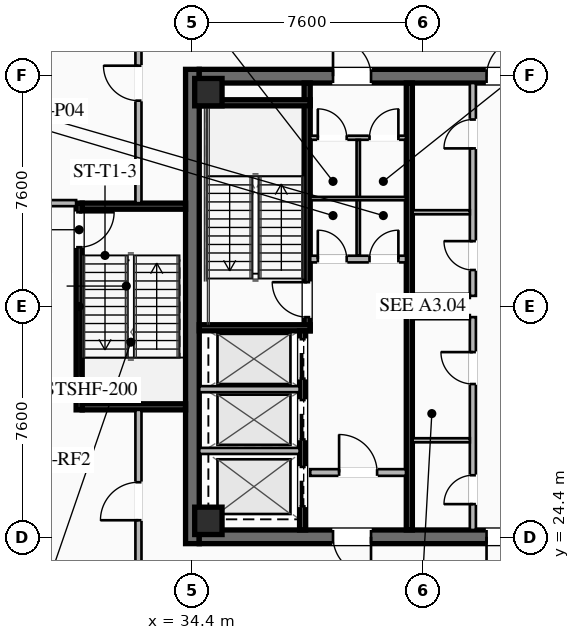
"""IFC4 building model, lengths in metres.
Left out: names, types, materials, properties, quantities, classifications, styles, units other than length and angle.
Written with IfcOpenShell. Run it as: python <this file> out.ifc"""

import sys

from ifc_helpers import new_model, si_unit, direction, frame, frame_2d, origin, origin_2d, place, context, subcontext, project, spatial, rectangle, hollow_rectangle, extrude, element, fill, save


model = new_model("IFC4")
c1 = context("Model", 3, precision=1e-05, world=origin(), true_north=direction((0.0, 1.0)))
c2 = subcontext(c1, "Body", "Model", "MODEL_VIEW")
j1 = project(units=[si_unit("LENGTHUNIT", "METRE"), si_unit("PLANEANGLEUNIT", "RADIAN")], contexts=[c1])
p1 = place(None, origin())
s1 = spatial("IfcSite", under=j1, at=p1, CompositionType="ELEMENT")
p2 = place(p1, origin())
s2 = spatial("IfcBuilding", under=s1, at=p2, CompositionType="ELEMENT")
p3 = place(p2, frame((0.0, 0.0, 246.8)))
s3 = spatial("IfcBuildingStorey", under=s2, at=p3, CompositionType="ELEMENT", Elevation=246.8)
p4 = place(p3, frame((34.425, 24.2, 0.0), z_axis=(0.0, 0.0, 1.0), x_axis=(0.0, 1.0, 0.0)))
e1 = element("IfcWall", 1, at=p4, inside=s3, PredefinedType="SHEAR", context=c2, shape_type="SweptSolid", body=[
    extrude(rectangle(XDim=15.6, YDim=0.45, at=frame_2d((7.8, 0.0))), origin(), (0.0, 0.0, 1.0), 4.6),
])
p5 = place(p3, frame((49.35, 24.425, 0.0), z_axis=(0.0, 0.0, 1.0), x_axis=(-1.0, 0.0, 0.0)))
e2 = element("IfcWall", 2, at=p5, inside=s3, PredefinedType="SHEAR", context=c2, shape_type="SweptSolid", body=[
    extrude(rectangle(XDim=14.7, YDim=0.45, at=frame_2d((7.35, 0.0))), origin(), (0.0, 0.0, 1.0), 4.6),
])
p6 = place(p5, frame((9.05, 0.0, 0.0)))
e3 = element("IfcOpeningElement", 3, at=p6, cuts=e2, PredefinedType="OPENING", context=c2, shape_type="SweptSolid", body=[
    extrude(rectangle(XDim=1.25, YDim=2.25, at=frame_2d((0.625, 1.125))), frame((0.0, 0.235, 0.0), z_axis=(0.0, -1.0, 0.0), x_axis=(1.0, 0.0, 0.0)), (0.0, 0.0, 1.0), 0.47),
])
p7 = place(p5, frame((4.0, 0.0, 0.0)))
e4 = element("IfcOpeningElement", 4, at=p7, cuts=e2, PredefinedType="OPENING", context=c2, shape_type="SweptSolid", body=[
    extrude(rectangle(XDim=1.25, YDim=2.25, at=frame_2d((0.625, 1.125))), frame((0.0, 0.235, 0.0), z_axis=(0.0, -1.0, 0.0), x_axis=(1.0, 0.0, 0.0)), (0.0, 0.0, 1.0), 0.47),
])
p8 = place(p3, frame((34.65, 39.575, 0.0), z_axis=(0.0, 0.0, 1.0), x_axis=(1.0, 0.0, 0.0)))
e5 = element("IfcWall", 5, at=p8, inside=s3, PredefinedType="SHEAR", context=c2, shape_type="SweptSolid", body=[
    extrude(rectangle(XDim=14.7, YDim=0.45, at=frame_2d((7.35, 0.0))), origin(), (0.0, 0.0, 1.0), 4.6),
])
p9 = place(p8, frame((4.4, 0.0, 0.0)))
e6 = element("IfcOpeningElement", 6, at=p9, cuts=e5, PredefinedType="OPENING", context=c2, shape_type="SweptSolid", body=[
    extrude(rectangle(XDim=1.25, YDim=2.25, at=frame_2d((0.625, 1.125))), frame((0.0, 0.235, 0.0), z_axis=(0.0, -1.0, 0.0), x_axis=(1.0, 0.0, 0.0)), (0.0, 0.0, 1.0), 0.47),
])
p10 = place(p8, frame((9.45, 0.0, 0.0)))
e7 = element("IfcOpeningElement", 7, at=p10, cuts=e5, PredefinedType="OPENING", context=c2, shape_type="SweptSolid", body=[
    extrude(rectangle(XDim=1.25, YDim=2.25, at=frame_2d((0.625, 1.125))), frame((0.0, 0.235, 0.0), z_axis=(0.0, -1.0, 0.0), x_axis=(1.0, 0.0, 0.0)), (0.0, 0.0, 1.0), 0.47),
])
for number, where, z_axis, x_axis in (
    (8, (34.95, 24.95, 0.0), (0.0, 0.0, 1.0), (1.0, 0.0, 0.0)),
    (9, (34.95, 39.05, 0.0), (0.0, 0.0, 1.0), (1.0, 0.0, 0.0)),
):
    element("IfcColumn", number, at=place(p3, frame(where, z_axis=z_axis, x_axis=x_axis)), inside=s3, PredefinedType="COLUMN", context=c2, shape_type="SweptSolid", body=[
        extrude(hollow_rectangle(XDim=0.9, YDim=0.9, WallThickness=0.04, at=origin_2d()), origin(), (0.0, 0.0, 1.0), 4.38),
    ])
p11 = place(p3, frame((38.2, 31.2, 0.0), z_axis=(0.0, 0.0, 1.0), x_axis=(0.0, 1.0, 0.0)))
e10 = element("IfcWall", 10, at=p11, inside=s3, PredefinedType="SHEAR", context=c2, shape_type="SweptSolid", body=[
    extrude(rectangle(XDim=8.15, YDim=0.2, at=frame_2d((4.075, 0.0))), origin(), (0.0, 0.0, 1.0), 4.38),
])
p12 = place(p11, frame((0.45, 0.0, 0.0)))
e11 = element("IfcOpeningElement", 11, at=p12, cuts=e10, PredefinedType="OPENING", context=c2, shape_type="SweptSolid", body=[
    extrude(rectangle(XDim=1.15, YDim=2.2, at=frame_2d((0.575, 1.1))), frame((0.0, 0.11, 0.0), z_axis=(0.0, -1.0, 0.0), x_axis=(1.0, 0.0, 0.0)), (0.0, 0.0, 1.0), 0.22),
])
for number, where, z_axis, x_axis in (
    (12, (34.65, 31.3, 0.0), (0.0, 0.0, 1.0), (1.0, 0.0, 0.0)),
    (13, (34.65, 38.7, 0.0), (0.0, 0.0, 1.0), (1.0, 0.0, 0.0)),
):
    element("IfcWall", number, at=place(p3, frame(where, z_axis=z_axis, x_axis=x_axis)), inside=s3, PredefinedType="SHEAR", context=c2, shape_type="SweptSolid", body=[
        extrude(rectangle(XDim=3.65, YDim=0.2, at=frame_2d((1.825, 0.0))), origin(), (0.0, 0.0, 1.0), 4.38),
    ])
p13 = place(p3, frame((41.56, 24.65, 0.0), z_axis=(0.0, 0.0, 1.0), x_axis=(0.0, 1.0, 0.0)))
e14 = element("IfcWall", 14, at=p13, inside=s3, PredefinedType="SHEAR", context=c2, shape_type="SweptSolid", body=[
    extrude(rectangle(XDim=14.7, YDim=0.2, at=frame_2d((7.35, 0.0))), origin(), (0.0, 0.0, 1.0), 4.38),
])
p14 = place(p3, frame((38.3, 33.56, 0.0), z_axis=(0.0, 0.0, 1.0), x_axis=(1.0, 0.0, 0.0)))
e15 = element("IfcWall", 15, at=p14, inside=s3, PredefinedType="SOLIDWALL", context=c2, shape_type="SweptSolid", body=[
    extrude(rectangle(XDim=3.15, YDim=0.22, at=frame_2d((1.575, 0.0))), origin(), (0.0, 0.0, 1.0), 3.491),
])
p15 = place(p14, frame((0.25, 0.0, 0.0)))
e16 = element("IfcOpeningElement", 16, at=p15, cuts=e15, PredefinedType="OPENING", context=c2, shape_type="SweptSolid", body=[
    extrude(rectangle(XDim=0.95, YDim=2.05, at=frame_2d((0.475, 1.025))), frame((0.0, 0.12, 0.0), z_axis=(0.0, -1.0, 0.0), x_axis=(1.0, 0.0, 0.0)), (0.0, 0.0, 1.0), 0.24),
])
p16 = place(p14, frame((1.95, 0.0, 0.0)))
e17 = element("IfcOpeningElement", 17, at=p16, cuts=e15, PredefinedType="OPENING", context=c2, shape_type="SweptSolid", body=[
    extrude(rectangle(XDim=0.95, YDim=2.05, at=frame_2d((0.475, 1.025))), frame((0.0, 0.12, 0.0), z_axis=(0.0, -1.0, 0.0), x_axis=(1.0, 0.0, 0.0)), (0.0, 0.0, 1.0), 0.24),
])
p17 = place(p3, frame((38.3, 26.54, 0.0), z_axis=(0.0, 0.0, 1.0), x_axis=(1.0, 0.0, 0.0)))
e18 = element("IfcWall", 18, at=p17, inside=s3, PredefinedType="SOLIDWALL", context=c2, shape_type="SweptSolid", body=[
    extrude(rectangle(XDim=3.15, YDim=0.22, at=frame_2d((1.575, 0.0))), origin(), (0.0, 0.0, 1.0), 3.491),
])
p18 = place(p17, frame((0.95, 0.0, 0.0)))
e19 = element("IfcOpeningElement", 19, at=p18, cuts=e18, PredefinedType="OPENING", context=c2, shape_type="SweptSolid", body=[
    extrude(rectangle(XDim=1.25, YDim=2.25, at=frame_2d((0.625, 1.125))), frame((0.0, 0.12, 0.0), z_axis=(0.0, -1.0, 0.0), x_axis=(1.0, 0.0, 0.0)), (0.0, 0.0, 1.0), 0.24),
])
p19 = place(p3, frame((38.05, 24.65, 0.0), z_axis=(0.0, 0.0, 1.0), x_axis=(0.0, 1.0, 0.0)))
e20 = element("IfcWall", 20, at=p19, inside=s3, PredefinedType="SHEAR", context=c2, shape_type="SweptSolid", body=[
    extrude(rectangle(XDim=6.55, YDim=0.2, at=frame_2d((3.275, 0.0))), origin(), (0.0, 0.0, 1.0), 4.38),
])
p20 = place(p19, frame((4.975, 0.0, 0.0)))
e21 = element("IfcOpeningElement", 21, at=p20, cuts=e20, PredefinedType="OPENING", context=c2, shape_type="SweptSolid", body=[
    extrude(rectangle(XDim=1.3, YDim=2.25, at=frame_2d((0.65, 1.125))), frame((0.0, 0.11, 0.0), z_axis=(0.0, -1.0, 0.0), x_axis=(1.0, 0.0, 0.0)), (0.0, 0.0, 1.0), 0.22),
])
p21 = place(p19, frame((2.975, 0.0, 0.0)))
e22 = element("IfcOpeningElement", 22, at=p21, cuts=e20, PredefinedType="OPENING", context=c2, shape_type="SweptSolid", body=[
    extrude(rectangle(XDim=1.3, YDim=2.25, at=frame_2d((0.65, 1.125))), frame((0.0, 0.11, 0.0), z_axis=(0.0, -1.0, 0.0), x_axis=(1.0, 0.0, 0.0)), (0.0, 0.0, 1.0), 0.22),
])
p22 = place(p19, frame((0.775, 0.0, 0.0)))
e23 = element("IfcOpeningElement", 23, at=p22, cuts=e20, PredefinedType="OPENING", context=c2, shape_type="SweptSolid", body=[
    extrude(rectangle(XDim=1.3, YDim=2.25, at=frame_2d((0.65, 1.125))), frame((0.0, 0.11, 0.0), z_axis=(0.0, -1.0, 0.0), x_axis=(1.0, 0.0, 0.0)), (0.0, 0.0, 1.0), 0.22),
])
for number, where, z_axis, x_axis in (
    (24, (34.65, 27.25, 0.0), (0.0, 0.0, 1.0), (1.0, 0.0, 0.0)),
    (25, (34.65, 29.28, 0.0), (0.0, 0.0, 1.0), (1.0, 0.0, 0.0)),
):
    element("IfcWall", number, at=place(p3, frame(where, z_axis=z_axis, x_axis=x_axis)), inside=s3, PredefinedType="SOLIDWALL", context=c2, shape_type="SweptSolid", body=[
        extrude(rectangle(XDim=3.3, YDim=0.2, at=frame_2d((1.65, 0.0))), origin(), (0.0, 0.0, 1.0), 4.38),
    ])
p23 = place(p3, frame((38.3, 37.55, 0.0), z_axis=(0.0, 0.0, 1.0), x_axis=(1.0, 0.0, 0.0)))
e26 = element("IfcWall", 26, at=p23, inside=s3, PredefinedType="PARTITIONING", context=c2, shape_type="SweptSolid", body=[
    extrude(rectangle(XDim=3.15, YDim=0.135, at=frame_2d((1.575, 0.0))), origin(), (0.0, 0.0, 1.0), 3.491),
])
p24 = place(p23, frame((0.25, 0.0, 0.0)))
e27 = element("IfcOpeningElement", 27, at=p24, cuts=e26, PredefinedType="OPENING", context=c2, shape_type="SweptSolid", body=[
    extrude(rectangle(XDim=0.95, YDim=2.05, at=frame_2d((0.475, 1.025))), frame((0.0, 0.077, 0.0), z_axis=(0.0, -1.0, 0.0), x_axis=(1.0, 0.0, 0.0)), (0.0, 0.0, 1.0), 0.155),
])
p25 = place(p23, frame((1.95, 0.0, 0.0)))
e28 = element("IfcOpeningElement", 28, at=p25, cuts=e26, PredefinedType="OPENING", context=c2, shape_type="SweptSolid", body=[
    extrude(rectangle(XDim=0.95, YDim=2.05, at=frame_2d((0.475, 1.025))), frame((0.0, 0.077, 0.0), z_axis=(0.0, -1.0, 0.0), x_axis=(1.0, 0.0, 0.0)), (0.0, 0.0, 1.0), 0.155),
])
p26 = place(p3, frame((39.88, 33.68, 0.0), z_axis=(0.0, 0.0, 1.0), x_axis=(0.0, 1.0, 0.0)))
e29 = element("IfcWall", 29, at=p26, inside=s3, PredefinedType="PARTITIONING", context=c2, shape_type="SweptSolid", body=[
    extrude(rectangle(XDim=3.8, YDim=0.11, at=frame_2d((1.9, 0.0))), origin(), (0.0, 0.0, 1.0), 3.491),
])
p27 = place(p3, frame((38.3, 35.55, 0.0), z_axis=(0.0, 0.0, 1.0), x_axis=(1.0, 0.0, 0.0)))
e30 = element("IfcWall", 30, at=p27, inside=s3, PredefinedType="PARTITIONING", context=c2, shape_type="SweptSolid", body=[
    extrude(rectangle(XDim=3.15, YDim=0.11, at=frame_2d((1.575, 0.0))), origin(), (0.0, 0.0, 1.0), 3.491),
])
p28 = place(p3, frame((43.65, 24.65, 0.0), z_axis=(0.0, 0.0, 1.0), x_axis=(0.0, 1.0, 0.0)))
e31 = element("IfcWall", 31, at=p28, inside=s3, PredefinedType="SOLIDWALL", context=c2, shape_type="SweptSolid", body=[
    extrude(rectangle(XDim=7.0, YDim=0.2, at=frame_2d((3.5, 0.0))), origin(), (0.0, 0.0, 1.0), 3.491),
])
p29 = place(p28, frame((0.85, 0.0, 0.0)))
e32 = element("IfcOpeningElement", 32, at=p29, cuts=e31, PredefinedType="OPENING", context=c2, shape_type="SweptSolid", body=[
    extrude(rectangle(XDim=0.95, YDim=2.05, at=frame_2d((0.475, 1.025))), frame((0.0, 0.11, 0.0), z_axis=(0.0, -1.0, 0.0), x_axis=(1.0, 0.0, 0.0)), (0.0, 0.0, 1.0), 0.22),
])
p30 = place(p28, frame((4.8, 0.0, 0.0)))
e33 = element("IfcOpeningElement", 33, at=p30, cuts=e31, PredefinedType="OPENING", context=c2, shape_type="SweptSolid", body=[
    extrude(rectangle(XDim=1.05, YDim=2.2, at=frame_2d((0.525, 1.1))), frame((0.0, 0.11, 0.0), z_axis=(0.0, -1.0, 0.0), x_axis=(1.0, 0.0, 0.0)), (0.0, 0.0, 1.0), 0.22),
])
for number, where, z_axis, x_axis in (
    (34, (41.67, 31.65, 0.0), (0.0, 0.0, 1.0), (1.0, 0.0, 0.0)),
    (35, (41.67, 27.6, 0.0), (0.0, 0.0, 1.0), (1.0, 0.0, 0.0)),
):
    element("IfcWall", number, at=place(p3, frame(where, z_axis=z_axis, x_axis=x_axis)), inside=s3, PredefinedType="PARTITIONING", context=c2, shape_type="SweptSolid", body=[
        extrude(rectangle(XDim=1.88, YDim=0.135, at=frame_2d((0.94, 0.0))), origin(), (0.0, 0.0, 1.0), 3.491),
    ])
p31 = place(p3, frame((43.65, 32.35, 0.0), z_axis=(0.0, 0.0, 1.0), x_axis=(0.0, 1.0, 0.0)))
e36 = element("IfcWall", 36, at=p31, inside=s3, PredefinedType="SOLIDWALL", context=c2, shape_type="SweptSolid", body=[
    extrude(rectangle(XDim=7.0, YDim=0.2, at=frame_2d((3.5, 0.0))), origin(), (0.0, 0.0, 1.0), 3.491),
])
p32 = place(p31, frame((0.85, 0.0, 0.0)))
e37 = element("IfcOpeningElement", 37, at=p32, cuts=e36, PredefinedType="OPENING", context=c2, shape_type="SweptSolid", body=[
    extrude(rectangle(XDim=0.95, YDim=2.05, at=frame_2d((0.475, 1.025))), frame((0.0, 0.11, 0.0), z_axis=(0.0, -1.0, 0.0), x_axis=(1.0, 0.0, 0.0)), (0.0, 0.0, 1.0), 0.22),
])
p33 = place(p31, frame((4.85, 0.0, 0.0)))
e38 = element("IfcOpeningElement", 38, at=p33, cuts=e36, PredefinedType="OPENING", context=c2, shape_type="SweptSolid", body=[
    extrude(rectangle(XDim=0.95, YDim=2.05, at=frame_2d((0.475, 1.025))), frame((0.0, 0.11, 0.0), z_axis=(0.0, -1.0, 0.0), x_axis=(1.0, 0.0, 0.0)), (0.0, 0.0, 1.0), 0.22),
])
for number, where, z_axis, x_axis in (
    (39, (41.67, 32.35, 0.0), (0.0, 0.0, 1.0), (1.0, 0.0, 0.0)),
    (40, (41.67, 35.1, 0.0), (0.0, 0.0, 1.0), (1.0, 0.0, 0.0)),
):
    element("IfcWall", number, at=place(p3, frame(where, z_axis=z_axis, x_axis=x_axis)), inside=s3, PredefinedType="PARTITIONING", context=c2, shape_type="SweptSolid", body=[
        extrude(rectangle(XDim=1.88, YDim=0.135, at=frame_2d((0.94, 0.0))), origin(), (0.0, 0.0, 1.0), 3.491),
    ])
p34 = place(p3, frame((30.7, 35.4, 0.0), z_axis=(0.0, 0.0, 1.0), x_axis=(0.0, -1.0, 0.0)))
e41 = element("IfcWall", 41, at=p34, inside=s3, PredefinedType="SHEAR", context=c2, shape_type="SweptSolid", body=[
    extrude(rectangle(XDim=6.8, YDim=0.2, at=frame_2d((3.4, 0.0))), origin(), (0.0, 0.0, 1.0), 4.38),
])
p35 = place(p34, frame((0.3, 0.0, 0.0)))
e42 = element("IfcOpeningElement", 42, at=p35, cuts=e41, PredefinedType="OPENING", context=c2, shape_type="SweptSolid", body=[
    extrude(rectangle(XDim=1.15, YDim=2.2, at=frame_2d((0.575, 1.1))), frame((0.0, 0.11, 0.0), z_axis=(0.0, -1.0, 0.0), x_axis=(1.0, 0.0, 0.0)), (0.0, 0.0, 1.0), 0.22),
])
for number, where, z_axis, x_axis in (
    (43, (34.2, 35.3, 0.0), (0.0, 0.0, 1.0), (-1.0, 0.0, 0.0)),
    (44, (30.8, 28.7, 0.0), (0.0, 0.0, 1.0), (1.0, 0.0, 0.0)),
):
    element("IfcWall", number, at=place(p3, frame(where, z_axis=z_axis, x_axis=x_axis)), inside=s3, PredefinedType="SHEAR", context=c2, shape_type="SweptSolid", body=[
        extrude(rectangle(XDim=3.4, YDim=0.2, at=frame_2d((1.7, 0.0))), origin(), (0.0, 0.0, 1.0), 4.38),
    ])
p36 = place(p3, frame((32.65, 22.77, 0.0), z_axis=(0.0, 0.0, 1.0), x_axis=(0.0, 1.0, 0.0)))
e45 = element("IfcWall", 45, at=p36, inside=s3, PredefinedType="SOLIDWALL", context=c2, shape_type="SweptSolid", body=[
    extrude(rectangle(XDim=5.83, YDim=0.2, at=frame_2d((2.915, 0.0))), origin(), (0.0, 0.0, 1.0), 3.491),
])
p37 = place(p36, frame((2.2, 0.0, 0.0)))
e46 = element("IfcOpeningElement", 46, at=p37, cuts=e45, PredefinedType="OPENING", context=c2, shape_type="SweptSolid", body=[
    extrude(rectangle(XDim=1.25, YDim=2.25, at=frame_2d((0.625, 1.125))), frame((0.0, 0.11, 0.0), z_axis=(0.0, -1.0, 0.0), x_axis=(1.0, 0.0, 0.0)), (0.0, 0.0, 1.0), 0.22),
])
p38 = place(p3, frame((32.65, 35.4, 0.0), z_axis=(0.0, 0.0, 1.0), x_axis=(0.0, 1.0, 0.0)))
e47 = element("IfcWall", 47, at=p38, inside=s3, PredefinedType="SOLIDWALL", context=c2, shape_type="SweptSolid", body=[
    extrude(rectangle(XDim=5.83, YDim=0.2, at=frame_2d((2.915, 0.0))), origin(), (0.0, 0.0, 1.0), 3.491),
])
p39 = place(p38, frame((3.37, 0.0, 0.0)))
e48 = element("IfcOpeningElement", 48, at=p39, cuts=e47, PredefinedType="OPENING", context=c2, shape_type="SweptSolid", body=[
    extrude(rectangle(XDim=1.15, YDim=2.2, at=frame_2d((0.575, 1.1))), frame((0.0, 0.11, 0.0), z_axis=(0.0, -1.0, 0.0), x_axis=(1.0, 0.0, 0.0)), (0.0, 0.0, 1.0), 0.22),
])
p40 = place(p3, frame((26.32, 35.4, 0.0), z_axis=(0.0, 0.0, 1.0), x_axis=(1.0, 0.0, 0.0)))
e49 = element("IfcWall", 49, at=p40, inside=s3, PredefinedType="SOLIDWALL", context=c2, shape_type="SweptSolid", body=[
    extrude(rectangle(XDim=4.28, YDim=0.2, at=frame_2d((2.14, 0.0))), origin(), (0.0, 0.0, 1.0), 3.491),
])
p41 = place(p9, origin())
e50 = element("IfcDoor", 50, at=p41, inside=s3, OperationType="SINGLE_SWING_LEFT", PredefinedType="DOOR", context=c2, shape_type="SweptSolid", body=[
    extrude(rectangle(XDim=1.25, YDim=2.25, at=frame_2d((0.625, 1.125))), frame((0.0, 0.025, 0.0), z_axis=(0.0, -1.0, 0.0), x_axis=(1.0, 0.0, 0.0)), (0.0, 0.0, 1.0), 0.05),
])
fill(e6, e50)
p42 = place(p10, origin())
e51 = element("IfcDoor", 51, at=p42, inside=s3, OperationType="SINGLE_SWING_RIGHT", PredefinedType="DOOR", context=c2, shape_type="SweptSolid", body=[
    extrude(rectangle(XDim=1.25, YDim=2.25, at=frame_2d((0.625, 1.125))), frame((0.0, 0.025, 0.0), z_axis=(0.0, -1.0, 0.0), x_axis=(1.0, 0.0, 0.0)), (0.0, 0.0, 1.0), 0.05),
])
fill(e7, e51)
p43 = place(p6, origin())
e52 = element("IfcDoor", 52, at=p43, inside=s3, OperationType="SINGLE_SWING_LEFT", PredefinedType="DOOR", context=c2, shape_type="SweptSolid", body=[
    extrude(rectangle(XDim=1.25, YDim=2.25, at=frame_2d((0.625, 1.125))), frame((0.0, 0.025, 0.0), z_axis=(0.0, -1.0, 0.0), x_axis=(1.0, 0.0, 0.0)), (0.0, 0.0, 1.0), 0.05),
])
fill(e3, e52)
p44 = place(p7, origin())
e53 = element("IfcDoor", 53, at=p44, inside=s3, OperationType="SINGLE_SWING_RIGHT", PredefinedType="DOOR", context=c2, shape_type="SweptSolid", body=[
    extrude(rectangle(XDim=1.25, YDim=2.25, at=frame_2d((0.625, 1.125))), frame((0.0, 0.025, 0.0), z_axis=(0.0, -1.0, 0.0), x_axis=(1.0, 0.0, 0.0)), (0.0, 0.0, 1.0), 0.05),
])
fill(e4, e53)
p45 = place(p12, origin())
e54 = element("IfcDoor", 54, at=p45, inside=s3, OperationType="SINGLE_SWING_RIGHT", PredefinedType="DOOR", context=c2, shape_type="SweptSolid", body=[
    extrude(rectangle(XDim=1.15, YDim=2.2, at=frame_2d((0.575, 1.1))), frame((0.0, 0.025, 0.0), z_axis=(0.0, -1.0, 0.0), x_axis=(1.0, 0.0, 0.0)), (0.0, 0.0, 1.0), 0.05),
])
fill(e11, e54)
p46 = place(p18, origin())
e55 = element("IfcDoor", 55, at=p46, inside=s3, OperationType="SINGLE_SWING_LEFT", PredefinedType="DOOR", context=c2, shape_type="SweptSolid", body=[
    extrude(rectangle(XDim=1.25, YDim=2.25, at=frame_2d((0.625, 1.125))), frame((0.0, 0.025, 0.0), z_axis=(0.0, -1.0, 0.0), x_axis=(1.0, 0.0, 0.0)), (0.0, 0.0, 1.0), 0.05),
])
fill(e19, e55)
p47 = place(p24, origin())
e56 = element("IfcDoor", 56, at=p47, inside=s3, OperationType="SINGLE_SWING_LEFT", PredefinedType="DOOR", context=c2, shape_type="SweptSolid", body=[
    extrude(rectangle(XDim=0.95, YDim=2.05, at=frame_2d((0.475, 1.025))), frame((0.0, 0.025, 0.0), z_axis=(0.0, -1.0, 0.0), x_axis=(1.0, 0.0, 0.0)), (0.0, 0.0, 1.0), 0.05),
])
fill(e27, e56)
p48 = place(p25, origin())
e57 = element("IfcDoor", 57, at=p48, inside=s3, OperationType="SINGLE_SWING_RIGHT", PredefinedType="DOOR", context=c2, shape_type="SweptSolid", body=[
    extrude(rectangle(XDim=0.95, YDim=2.05, at=frame_2d((0.475, 1.025))), frame((0.0, 0.025, 0.0), z_axis=(0.0, -1.0, 0.0), x_axis=(1.0, 0.0, 0.0)), (0.0, 0.0, 1.0), 0.05),
])
fill(e28, e57)
p49 = place(p15, origin())
e58 = element("IfcDoor", 58, at=p49, inside=s3, OperationType="SINGLE_SWING_LEFT", PredefinedType="DOOR", context=c2, shape_type="SweptSolid", body=[
    extrude(rectangle(XDim=0.95, YDim=2.05, at=frame_2d((0.475, 1.025))), frame((0.0, 0.025, 0.0), z_axis=(0.0, -1.0, 0.0), x_axis=(1.0, 0.0, 0.0)), (0.0, 0.0, 1.0), 0.05),
])
fill(e16, e58)
p50 = place(p16, origin())
e59 = element("IfcDoor", 59, at=p50, inside=s3, OperationType="SINGLE_SWING_RIGHT", PredefinedType="DOOR", context=c2, shape_type="SweptSolid", body=[
    extrude(rectangle(XDim=0.95, YDim=2.05, at=frame_2d((0.475, 1.025))), frame((0.0, 0.025, 0.0), z_axis=(0.0, -1.0, 0.0), x_axis=(1.0, 0.0, 0.0)), (0.0, 0.0, 1.0), 0.05),
])
fill(e17, e59)
p51 = place(p29, origin())
e60 = element("IfcDoor", 60, at=p51, inside=s3, OperationType="SINGLE_SWING_LEFT", PredefinedType="DOOR", context=c2, shape_type="SweptSolid", body=[
    extrude(rectangle(XDim=0.95, YDim=2.05, at=frame_2d((0.475, 1.025))), frame((0.0, 0.025, 0.0), z_axis=(0.0, -1.0, 0.0), x_axis=(1.0, 0.0, 0.0)), (0.0, 0.0, 1.0), 0.05),
])
fill(e32, e60)
p52 = place(p30, origin())
e61 = element("IfcDoor", 61, at=p52, inside=s3, OperationType="SINGLE_SWING_RIGHT", PredefinedType="DOOR", context=c2, shape_type="SweptSolid", body=[
    extrude(rectangle(XDim=1.05, YDim=2.2, at=frame_2d((0.525, 1.1))), frame((0.0, 0.025, 0.0), z_axis=(0.0, -1.0, 0.0), x_axis=(1.0, 0.0, 0.0)), (0.0, 0.0, 1.0), 0.05),
])
fill(e33, e61)
p53 = place(p32, origin())
e62 = element("IfcDoor", 62, at=p53, inside=s3, OperationType="SINGLE_SWING_RIGHT", PredefinedType="DOOR", context=c2, shape_type="SweptSolid", body=[
    extrude(rectangle(XDim=0.95, YDim=2.05, at=frame_2d((0.475, 1.025))), frame((0.0, 0.025, 0.0), z_axis=(0.0, -1.0, 0.0), x_axis=(1.0, 0.0, 0.0)), (0.0, 0.0, 1.0), 0.05),
])
fill(e37, e62)
p54 = place(p33, origin())
e63 = element("IfcDoor", 63, at=p54, inside=s3, OperationType="SINGLE_SWING_LEFT", PredefinedType="DOOR", context=c2, shape_type="SweptSolid", body=[
    extrude(rectangle(XDim=0.95, YDim=2.05, at=frame_2d((0.475, 1.025))), frame((0.0, 0.025, 0.0), z_axis=(0.0, -1.0, 0.0), x_axis=(1.0, 0.0, 0.0)), (0.0, 0.0, 1.0), 0.05),
])
fill(e38, e63)
p55 = place(p35, origin())
e64 = element("IfcDoor", 64, at=p55, inside=s3, OperationType="SINGLE_SWING_LEFT", PredefinedType="DOOR", context=c2, shape_type="SweptSolid", body=[
    extrude(rectangle(XDim=1.15, YDim=2.2, at=frame_2d((0.575, 1.1))), frame((0.0, 0.025, 0.0), z_axis=(0.0, -1.0, 0.0), x_axis=(1.0, 0.0, 0.0)), (0.0, 0.0, 1.0), 0.05),
])
fill(e42, e64)
p56 = place(p37, origin())
e65 = element("IfcDoor", 65, at=p56, inside=s3, OperationType="SINGLE_SWING_LEFT", PredefinedType="DOOR", context=c2, shape_type="SweptSolid", body=[
    extrude(rectangle(XDim=1.25, YDim=2.25, at=frame_2d((0.625, 1.125))), frame((0.0, 0.025, 0.0), z_axis=(0.0, -1.0, 0.0), x_axis=(1.0, 0.0, 0.0)), (0.0, 0.0, 1.0), 0.05),
])
fill(e46, e65)
p57 = place(p39, origin())
e66 = element("IfcDoor", 66, at=p57, inside=s3, OperationType="SINGLE_SWING_RIGHT", PredefinedType="DOOR", context=c2, shape_type="SweptSolid", body=[
    extrude(rectangle(XDim=1.15, YDim=2.2, at=frame_2d((0.575, 1.1))), frame((0.0, 0.025, 0.0), z_axis=(0.0, -1.0, 0.0), x_axis=(1.0, 0.0, 0.0)), (0.0, 0.0, 1.0), 0.05),
])
fill(e48, e66)
p58 = place(p20, origin())
e67 = element("IfcDoor", 67, at=p58, inside=s3, OperationType="SLIDING_TO_LEFT", PredefinedType="DOOR", context=c2, shape_type="SweptSolid", body=[
    extrude(rectangle(XDim=1.3, YDim=2.25, at=frame_2d((0.65, 1.125))), frame((0.0, 0.025, 0.0), z_axis=(0.0, -1.0, 0.0), x_axis=(1.0, 0.0, 0.0)), (0.0, 0.0, 1.0), 0.05),
])
fill(e21, e67)
p59 = place(p21, origin())
e68 = element("IfcDoor", 68, at=p59, inside=s3, OperationType="SLIDING_TO_LEFT", PredefinedType="DOOR", context=c2, shape_type="SweptSolid", body=[
    extrude(rectangle(XDim=1.3, YDim=2.25, at=frame_2d((0.65, 1.125))), frame((0.0, 0.025, 0.0), z_axis=(0.0, -1.0, 0.0), x_axis=(1.0, 0.0, 0.0)), (0.0, 0.0, 1.0), 0.05),
])
fill(e22, e68)
p60 = place(p22, origin())
e69 = element("IfcDoor", 69, at=p60, inside=s3, OperationType="SLIDING_TO_LEFT", PredefinedType="DOOR", context=c2, shape_type="SweptSolid", body=[
    extrude(rectangle(XDim=1.3, YDim=2.25, at=frame_2d((0.65, 1.125))), frame((0.0, 0.025, 0.0), z_axis=(0.0, -1.0, 0.0), x_axis=(1.0, 0.0, 0.0)), (0.0, 0.0, 1.0), 0.05),
])
fill(e23, e69)
save(model, sys.argv[1])
